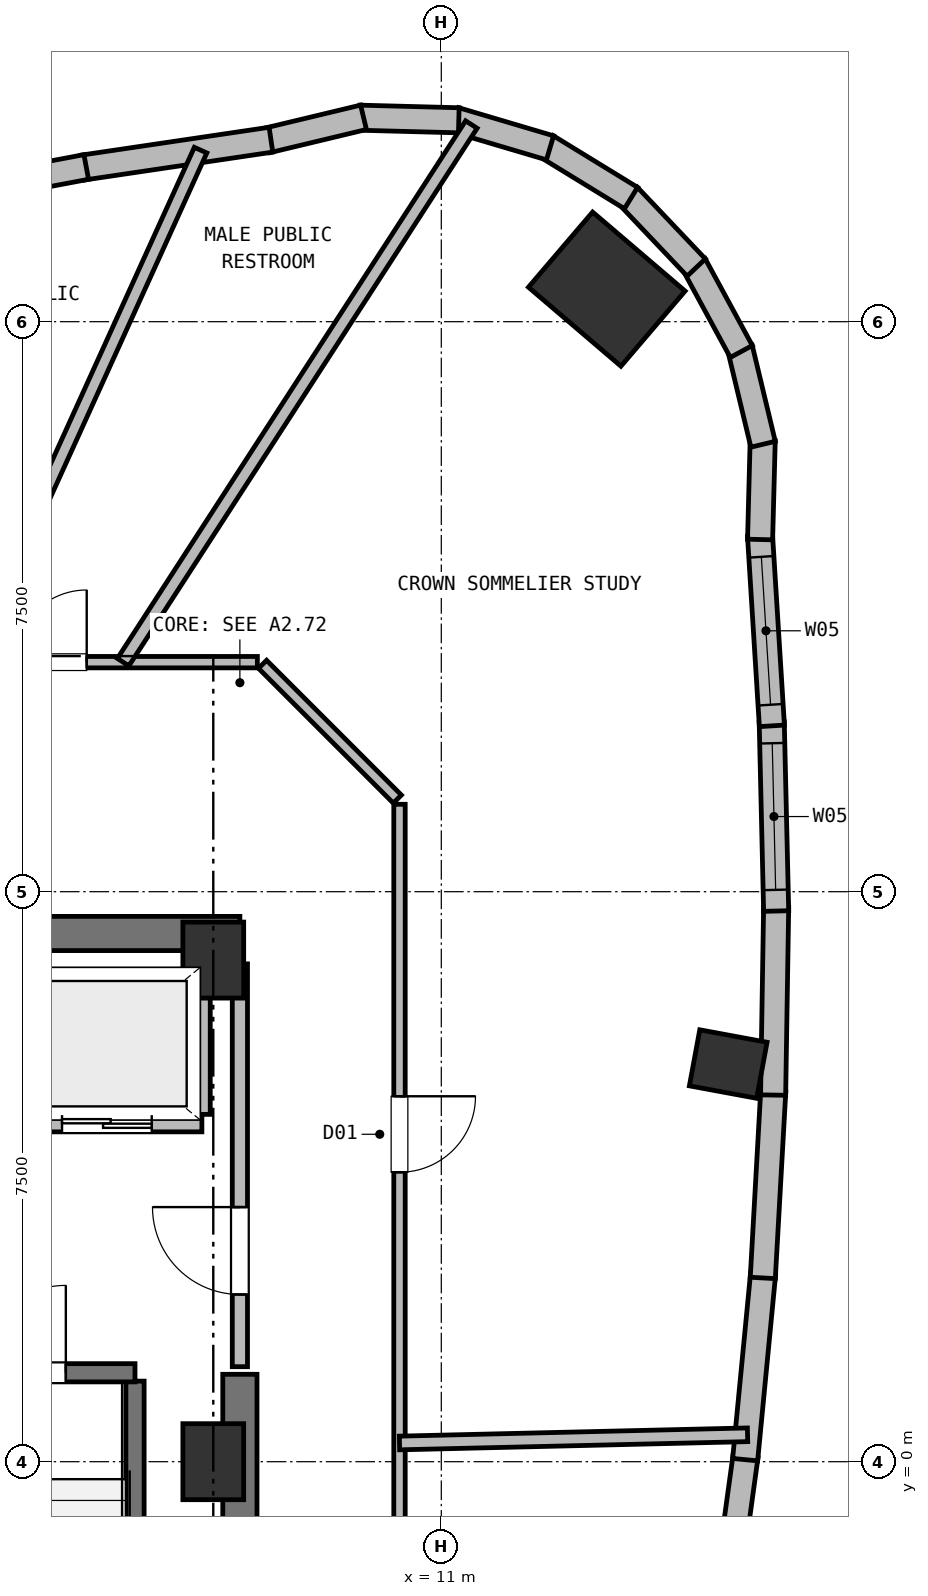
"""IFC4 building model, lengths in metres.
Left out: names, types, materials, properties, quantities, classifications, styles, units other than length and angle.
Written with IfcOpenShell. Run it as: python <this file> out.ifc"""

import sys

from ifc_helpers import new_model, si_unit, direction, frame, frame_2d, origin, origin_2d, place, context, subcontext, project, spatial, rectangle, extrude, element, fill, save


model = new_model("IFC4")
c1 = context("Model", 3, precision=1e-05, world=origin(), true_north=direction((0.0, 1.0)))
c2 = subcontext(c1, "Body", "Model", "MODEL_VIEW")
j1 = project(units=[si_unit("LENGTHUNIT", "METRE"), si_unit("PLANEANGLEUNIT", "RADIAN")], contexts=[c1])
p1 = place(None, origin())
s1 = spatial("IfcSite", under=j1, at=p1, CompositionType="ELEMENT")
p2 = place(p1, origin())
s2 = spatial("IfcBuilding", under=s1, at=p2, CompositionType="ELEMENT")
p3 = place(p2, frame((0.0, 0.0, 272.8)))
s3 = spatial("IfcBuildingStorey", under=s2, at=p3, CompositionType="ELEMENT", Elevation=272.8)
for number, where, z_axis, x_axis in (
    (1, (8.0, 0.0, 0.0), (0.0, 0.0, 1.0), (1.0, 0.0, 0.0)),
    (2, (8.0, 6.6, 0.0), (0.0, 0.0, 1.0), (1.0, 0.0, 0.0)),
):
    element("IfcColumn", number, at=place(p3, frame(where, z_axis=z_axis, x_axis=x_axis)), inside=s3, PredefinedType="COLUMN", context=c2, shape_type="SweptSolid", body=[
        extrude(rectangle(XDim=0.8, YDim=1.0, at=origin_2d()), origin(), (0.0, 0.0, 1.0), 4.4),
    ])
p4 = place(p3, frame((-8.35, 6.95, 0.0), z_axis=(0.0, 0.0, 1.0), x_axis=(1.0, 0.0, 0.0)))
e3 = element("IfcWall", 3, at=p4, inside=s3, PredefinedType="SHEAR", context=c2, shape_type="SweptSolid", body=[
    extrude(rectangle(XDim=16.7, YDim=0.45, at=frame_2d((8.35, 0.0))), origin(), (0.0, 0.0, 1.0), 4.15),
])
p5 = place(p3, frame((8.35, -6.95, 0.0), z_axis=(0.0, 0.0, 1.0), x_axis=(0.0, 1.0, 0.0)))
e4 = element("IfcWall", 4, at=p5, inside=s3, PredefinedType="SHEAR", context=c2, shape_type="SweptSolid", body=[
    extrude(rectangle(XDim=8.1, YDim=0.45, at=frame_2d((4.05, 0.0))), origin(), (0.0, 0.0, 1.0), 4.15),
])
p6 = place(p3, frame((14.775, 5.232, 0.0), z_axis=(0.0, 0.0, 1.0), x_axis=(0.182235525492, 0.983254907564, 0.0)))
e5 = element("IfcColumn", 5, at=p6, inside=s3, PredefinedType="COLUMN", context=c2, shape_type="SweptSolid", body=[
    extrude(rectangle(XDim=0.75, YDim=0.9, at=origin_2d()), origin(), (0.0, 0.0, 1.0), 4.4),
])
p7 = place(p3, frame((13.177, 15.428, 0.0), z_axis=(0.0, 0.0, 1.0), x_axis=(0.64944804833, 0.7604059656, 0.0)))
e6 = element("IfcColumn", 6, at=p7, inside=s3, PredefinedType="COLUMN", context=c2, shape_type="SweptSolid", body=[
    extrude(rectangle(XDim=1.3, YDim=1.6, at=origin_2d()), origin(), (0.0, 0.0, 1.0), 4.4),
])
p8 = place(p3, frame((15.003, 0.077, 0.0), z_axis=(0.0, 0.0, 1.0), x_axis=(-0.136310087879, -0.990666220249, 0.0)))
e7 = element("IfcWall", 7, at=p8, inside=s3, PredefinedType="SOLIDWALL", context=c2, shape_type="SweptSolid", body=[
    extrude(rectangle(XDim=2.448, YDim=0.33, at=frame_2d((1.224, 0.0))), origin(), (0.0, 0.0, 1.0), 4.15),
])
p9 = place(p3, frame((15.233, 2.468, 0.0), z_axis=(0.0, 0.0, 1.0), x_axis=(-0.096171472172, -0.995364781344, 0.0)))
e8 = element("IfcWall", 8, at=p9, inside=s3, PredefinedType="SOLIDWALL", context=c2, shape_type="SweptSolid", body=[
    extrude(rectangle(XDim=2.452, YDim=0.33, at=frame_2d((1.226, 0.0))), origin(), (0.0, 0.0, 1.0), 4.15),
])
p10 = place(p3, frame((15.367, 4.874, 0.0), z_axis=(0.0, 0.0, 1.0), x_axis=(-0.055970171644, -0.998432441323, 0.0)))
e9 = element("IfcWall", 9, at=p10, inside=s3, PredefinedType="SOLIDWALL", context=c2, shape_type="SweptSolid", body=[
    extrude(rectangle(XDim=2.46, YDim=0.33, at=frame_2d((1.23, 0.0))), origin(), (0.0, 0.0, 1.0), 4.15),
])
p11 = place(p3, frame((15.406, 7.295, 0.0), z_axis=(0.0, 0.0, 1.0), x_axis=(-0.016099859072, -0.999870388869, 0.0)))
e10 = element("IfcWall", 10, at=p11, inside=s3, PredefinedType="SOLIDWALL", context=c2, shape_type="SweptSolid", body=[
    extrude(rectangle(XDim=2.472, YDim=0.33, at=frame_2d((1.236, 0.0))), origin(), (0.0, 0.0, 1.0), 4.15),
])
p12 = place(p3, frame((15.347, 9.732, 0.0), z_axis=(0.0, 0.0, 1.0), x_axis=(0.023459423149, -0.999724789862, 0.0)))
e11 = element("IfcWall", 11, at=p12, inside=s3, PredefinedType="SOLIDWALL", context=c2, shape_type="SweptSolid", body=[
    extrude(rectangle(XDim=2.487, YDim=0.33, at=frame_2d((1.244, 0.0))), origin(), (0.0, 0.0, 1.0), 4.15),
])
p13 = place(p12, frame((0.279, 0.0, 0.72)))
e12 = element("IfcOpeningElement", 12, at=p13, cuts=e11, PredefinedType="OPENING", context=c2, shape_type="SweptSolid", body=[
    extrude(rectangle(XDim=1.93, YDim=2.15, at=frame_2d((0.965, 1.075))), frame((0.0, 0.175, 0.0), z_axis=(0.0, -1.0, 0.0), x_axis=(1.0, 0.0, 0.0)), (0.0, 0.0, 1.0), 0.35),
])
p14 = place(p3, frame((15.193, 12.184, 0.0), z_axis=(0.0, 0.0, 1.0), x_axis=(0.062329780416, -0.998055608908, 0.0)))
e13 = element("IfcWall", 13, at=p14, inside=s3, PredefinedType="SOLIDWALL", context=c2, shape_type="SweptSolid", body=[
    extrude(rectangle(XDim=2.507, YDim=0.33, at=frame_2d((1.253, 0.0))), origin(), (0.0, 0.0, 1.0), 4.15),
])
p15 = place(p14, frame((0.278, 0.0, 0.72)))
e14 = element("IfcOpeningElement", 14, at=p15, cuts=e13, PredefinedType="OPENING", context=c2, shape_type="SweptSolid", body=[
    extrude(rectangle(XDim=1.95, YDim=2.15, at=frame_2d((0.975, 1.075))), frame((0.0, 0.175, 0.0), z_axis=(0.0, -1.0, 0.0), x_axis=(1.0, 0.0, 0.0)), (0.0, 0.0, 1.0), 0.35),
])
p16 = place(p3, frame((15.229, 13.437, 0.0), z_axis=(0.0, 0.0, 1.0), x_axis=(-0.026227855826, -0.999655990618, 0.0)))
e15 = element("IfcWall", 15, at=p16, inside=s3, PredefinedType="SOLIDWALL", context=c2, shape_type="SweptSolid", body=[
    extrude(rectangle(XDim=1.303, YDim=0.33, at=frame_2d((0.652, 0.0))), origin(), (0.0, 0.0, 1.0), 4.15),
])
p17 = place(p3, frame((14.929, 14.654, 0.0), z_axis=(0.0, 0.0, 1.0), x_axis=(0.233443812137, -0.972370292931, 0.0)))
e16 = element("IfcWall", 16, at=p17, inside=s3, PredefinedType="SOLIDWALL", context=c2, shape_type="SweptSolid", body=[
    extrude(rectangle(XDim=1.303, YDim=0.33, at=frame_2d((0.651, 0.0))), origin(), (0.0, 0.0, 1.0), 4.15),
])
for number, where, z_axis, x_axis in (
    (17, (14.325, 15.753, 0.0), (0.0, 0.0, 1.0), (0.477, -0.879, 0.0)),
    (18, (13.458, 16.658, 0.0), (0.0, 0.0, 1.0), (0.688, -0.725, 0.0)),
    (19, (12.385, 17.308, 0.0), (0.0, 0.0, 1.0), (0.853, -0.523, 0.0)),
    (20, (11.181, 17.658, 0.0), (0.0, 0.0, 1.0), (0.959, -0.284, 0.0)),
    (21, (9.927, 17.684, 0.0), (0.0, 0.0, 1.0), (1.0, -0.026, 0.0)),
):
    element("IfcWall", number, at=place(p3, frame(where, z_axis=z_axis, x_axis=x_axis)), inside=s3, PredefinedType="SOLIDWALL", context=c2, shape_type="SweptSolid", body=[
        extrude(rectangle(XDim=1.303, YDim=0.33, at=frame_2d((0.652, 0.0))), origin(), (0.0, 0.0, 1.0), 4.15),
    ])
p18 = place(p3, frame((8.71, 17.385, 0.0), z_axis=(0.0, 0.0, 1.0), x_axis=(0.972360080062, 0.233486347997, 0.0)))
e22 = element("IfcWall", 22, at=p18, inside=s3, PredefinedType="SOLIDWALL", context=c2, shape_type="SweptSolid", body=[
    extrude(rectangle(XDim=1.303, YDim=0.33, at=frame_2d((0.651, 0.0))), origin(), (0.0, 0.0, 1.0), 4.15),
])
p19 = place(p3, frame((6.279, 17.027, 0.0), z_axis=(0.0, 0.0, 1.0), x_axis=(0.989195615859, 0.146601615152, 0.0)))
e23 = element("IfcWall", 23, at=p19, inside=s3, PredefinedType="SOLIDWALL", context=c2, shape_type="SweptSolid", body=[
    extrude(rectangle(XDim=2.506, YDim=0.33, at=frame_2d((1.253, 0.0))), origin(), (0.0, 0.0, 1.0), 4.15),
])
p20 = place(p3, frame((3.884, 16.575, 0.0), z_axis=(0.0, 0.0, 1.0), x_axis=(0.982755323562, 0.184910719024, 0.0)))
e24 = element("IfcWall", 24, at=p20, inside=s3, PredefinedType="SOLIDWALL", context=c2, shape_type="SweptSolid", body=[
    extrude(rectangle(XDim=2.488, YDim=0.33, at=frame_2d((1.244, 0.0))), origin(), (0.0, 0.0, 1.0), 4.15),
])
p21 = place(p3, frame((6.97, -6.16, 0.0), z_axis=(0.0, 0.0, 1.0), x_axis=(0.0, 1.0, 0.0)))
e25 = element("IfcWall", 25, at=p21, inside=s3, PredefinedType="SHEAR", context=c2, shape_type="SweptSolid", body=[
    extrude(rectangle(XDim=7.22, YDim=0.24, at=frame_2d((3.61, 0.0))), origin(), (0.0, 0.0, 1.0), 4.15),
])
p22 = place(p3, frame((4.01, 1.17, 0.0), z_axis=(0.0, 0.0, 1.0), x_axis=(1.0, 0.0, 0.0)))
e26 = element("IfcWall", 26, at=p22, inside=s3, PredefinedType="SHEAR", context=c2, shape_type="SweptSolid", body=[
    extrude(rectangle(XDim=2.96, YDim=0.24, at=frame_2d((1.48, 0.0))), origin(), (0.0, 0.0, 1.0), 4.15),
])
p23 = place(p22, frame((0.9, 0.0, 0.0)))
e27 = element("IfcOpeningElement", 27, at=p23, cuts=e26, PredefinedType="OPENING", context=c2, shape_type="SweptSolid", body=[
    extrude(rectangle(XDim=1.15, YDim=2.15, at=frame_2d((0.575, 1.075))), frame((0.0, 0.13, 0.0), z_axis=(0.0, -1.0, 0.0), x_axis=(1.0, 0.0, 0.0)), (0.0, 0.0, 1.0), 0.26),
])
p24 = place(p3, frame((5.35, 4.45, 0.0), z_axis=(0.0, 0.0, 1.0), x_axis=(1.0, 0.0, 0.0)))
e28 = element("IfcWall", 28, at=p24, inside=s3, PredefinedType="PARTITIONING", context=c2, shape_type="SweptSolid", body=[
    extrude(rectangle(XDim=2.5, YDim=0.22, at=frame_2d((1.25, 0.0))), origin(), (0.0, 0.0, 1.0), 4.15),
])
p25 = place(p24, frame((0.66, 0.0, 0.0)))
e29 = element("IfcOpeningElement", 29, at=p25, cuts=e28, PredefinedType="OPENING", context=c2, shape_type="SweptSolid", body=[
    extrude(rectangle(XDim=1.18, YDim=2.15, at=frame_2d((0.59, 1.075))), frame((0.0, 0.12, 0.0), z_axis=(0.0, -1.0, 0.0), x_axis=(1.0, 0.0, 0.0)), (0.0, 0.0, 1.0), 0.24),
])
p26 = place(p3, frame((7.85, 4.57, 0.0), z_axis=(0.0, 0.0, 1.0), x_axis=(0.0, 1.0, 0.0)))
e30 = element("IfcWall", 30, at=p26, inside=s3, PredefinedType="PARTITIONING", context=c2, shape_type="SweptSolid", body=[
    extrude(rectangle(XDim=2.155, YDim=0.22, at=frame_2d((1.078, 0.0))), origin(), (0.0, 0.0, 1.0), 3.83),
])
p27 = place(p3, frame((8.35, 1.25, 0.0), z_axis=(0.0, 0.0, 1.0), x_axis=(0.0, 1.0, 0.0)))
e31 = element("IfcWall", 31, at=p27, inside=s3, PredefinedType="PARTITIONING", context=c2, shape_type="SweptSolid", body=[
    extrude(rectangle(XDim=5.3, YDim=0.2, at=frame_2d((2.65, 0.0))), origin(), (0.0, 0.0, 1.0), 4.15),
])
p28 = place(p27, frame((0.95, 0.0, 0.0)))
e32 = element("IfcOpeningElement", 32, at=p28, cuts=e31, PredefinedType="OPENING", context=c2, shape_type="SweptSolid", body=[
    extrude(rectangle(XDim=1.15, YDim=2.15, at=frame_2d((0.575, 1.075))), frame((0.0, 0.11, 0.0), z_axis=(0.0, -1.0, 0.0), x_axis=(1.0, 0.0, 0.0)), (0.0, 0.0, 1.0), 0.22),
])
p29 = place(p3, frame((10.45, 8.65, 0.0), z_axis=(0.0, 0.0, 1.0), x_axis=(0.0, -1.0, 0.0)))
e33 = element("IfcWall", 33, at=p29, inside=s3, PredefinedType="PARTITIONING", context=c2, shape_type="SweptSolid", body=[
    extrude(rectangle(XDim=15.89, YDim=0.15, at=frame_2d((7.945, 0.0))), origin(), (0.0, 0.0, 1.0), 3.86),
])
p30 = place(p29, frame((11.597, 0.0, 0.0)))
e34 = element("IfcOpeningElement", 34, at=p30, cuts=e33, PredefinedType="OPENING", context=c2, shape_type="SweptSolid", body=[
    extrude(rectangle(XDim=1.0, YDim=2.15, at=frame_2d((0.5, 1.075))), frame((0.0, 0.085, 0.0), z_axis=(0.0, -1.0, 0.0), x_axis=(1.0, 0.0, 0.0)), (0.0, 0.0, 1.0), 0.17),
])
p31 = place(p29, frame((3.842, 0.0, 0.0)))
e35 = element("IfcOpeningElement", 35, at=p31, cuts=e33, PredefinedType="OPENING", context=c2, shape_type="SweptSolid", body=[
    extrude(rectangle(XDim=1.0, YDim=2.15, at=frame_2d((0.5, 1.075))), frame((0.0, 0.085, 0.0), z_axis=(0.0, -1.0, 0.0), x_axis=(1.0, 0.0, 0.0)), (0.0, 0.0, 1.0), 0.17),
])
p32 = place(p3, frame((8.648, 10.492, 0.0), z_axis=(0.0, 0.0, 1.0), x_axis=(0.707106781187, -0.707106781187, 0.0)))
e36 = element("IfcWall", 36, at=p32, inside=s3, PredefinedType="PARTITIONING", context=c2, shape_type="SweptSolid", body=[
    extrude(rectangle(XDim=2.508, YDim=0.15, at=frame_2d((1.254, 0.0))), origin(), (0.0, 0.0, 1.0), 4.15),
])
p33 = place(p3, frame((-11.51, 10.52, 0.0), z_axis=(0.0, 0.0, 1.0), x_axis=(1.0, 0.0, 0.0)))
e37 = element("IfcWall", 37, at=p33, inside=s3, PredefinedType="PARTITIONING", context=c2, shape_type="SweptSolid", body=[
    extrude(rectangle(XDim=20.09, YDim=0.15, at=frame_2d((10.045, 0.0))), origin(), (0.0, 0.0, 1.0), 4.15),
])
p34 = place(p33, frame((12.646, 0.0, 0.0)))
e38 = element("IfcOpeningElement", 38, at=p34, cuts=e37, PredefinedType="OPENING", context=c2, shape_type="SweptSolid", body=[
    extrude(rectangle(XDim=0.95, YDim=2.1, at=frame_2d((0.475, 1.05))), frame((0.0, 0.085, 0.0), z_axis=(0.0, -1.0, 0.0), x_axis=(1.0, 0.0, 0.0)), (0.0, 0.0, 1.0), 0.17),
])
p35 = place(p33, frame((14.763, 0.0, 0.0)))
e39 = element("IfcOpeningElement", 39, at=p35, cuts=e37, PredefinedType="OPENING", context=c2, shape_type="SweptSolid", body=[
    extrude(rectangle(XDim=0.95, YDim=2.1, at=frame_2d((0.475, 1.05))), frame((0.0, 0.085, 0.0), z_axis=(0.0, -1.0, 0.0), x_axis=(1.0, 0.0, 0.0)), (0.0, 0.0, 1.0), 0.17),
])
p36 = place(p33, frame((16.895, 0.0, 0.0)))
e40 = element("IfcOpeningElement", 40, at=p36, cuts=e37, PredefinedType="OPENING", context=c2, shape_type="SweptSolid", body=[
    extrude(rectangle(XDim=0.95, YDim=2.1, at=frame_2d((0.475, 1.05))), frame((0.0, 0.085, 0.0), z_axis=(0.0, -1.0, 0.0), x_axis=(1.0, 0.0, 0.0)), (0.0, 0.0, 1.0), 0.17),
])
p37 = place(p33, frame((5.671, 0.0, 0.0)))
e41 = element("IfcOpeningElement", 41, at=p37, cuts=e37, PredefinedType="OPENING", context=c2, shape_type="SweptSolid", body=[
    extrude(rectangle(XDim=1.0, YDim=2.15, at=frame_2d((0.5, 1.075))), frame((0.0, 0.085, 0.0), z_axis=(0.0, -1.0, 0.0), x_axis=(1.0, 0.0, 0.0)), (0.0, 0.0, 1.0), 0.17),
])
p38 = place(p3, frame((10.45, 0.246, 0.0), z_axis=(0.0, 0.0, 1.0), x_axis=(0.999722471899, 0.023557996086, 0.0)))
e42 = element("IfcWall", 42, at=p38, inside=s3, PredefinedType="PARTITIONING", context=c2, shape_type="SweptSolid", body=[
    extrude(rectangle(XDim=4.581, YDim=0.18, at=frame_2d((2.29, 0.0))), origin(), (0.0, 0.0, 1.0), 4.15),
])
p39 = place(p3, frame((6.814, 10.52, 0.0), z_axis=(0.0, 0.0, 1.0), x_axis=(0.543628362799, 0.839326041035, 0.0)))
e43 = element("IfcWall", 43, at=p39, inside=s3, PredefinedType="PARTITIONING", context=c2, shape_type="SweptSolid", body=[
    extrude(rectangle(XDim=8.428, YDim=0.18, at=frame_2d((4.214, 0.0))), origin(), (0.0, 0.0, 1.0), 4.15),
])
p40 = place(p3, frame((4.775, 10.52, 0.0), z_axis=(0.0, 0.0, 1.0), x_axis=(0.41332058742, 0.910585576437, 0.0)))
e44 = element("IfcWall", 44, at=p40, inside=s3, PredefinedType="PARTITIONING", context=c2, shape_type="SweptSolid", body=[
    extrude(rectangle(XDim=7.399, YDim=0.18, at=frame_2d((3.699, 0.0))), origin(), (0.0, 0.0, 1.0), 4.15),
])
p41 = place(p13, origin())
e45 = element("IfcWindow", 45, at=p41, inside=s3, PartitioningType="SINGLE_PANEL", PredefinedType="WINDOW", context=c2, shape_type="SweptSolid", body=[
    extrude(rectangle(XDim=1.93, YDim=2.15, at=frame_2d((0.965, 1.075))), frame((0.0, 0.03, 0.0), z_axis=(0.0, -1.0, 0.0), x_axis=(1.0, 0.0, 0.0)), (0.0, 0.0, 1.0), 0.06),
])
fill(e12, e45)
p42 = place(p15, origin())
e46 = element("IfcWindow", 46, at=p42, inside=s3, PartitioningType="SINGLE_PANEL", PredefinedType="WINDOW", context=c2, shape_type="SweptSolid", body=[
    extrude(rectangle(XDim=1.95, YDim=2.15, at=frame_2d((0.975, 1.075))), frame((0.0, 0.03, 0.0), z_axis=(0.0, -1.0, 0.0), x_axis=(1.0, 0.0, 0.0)), (0.0, 0.0, 1.0), 0.06),
])
fill(e14, e46)
p43 = place(p23, origin())
e47 = element("IfcDoor", 47, at=p43, inside=s3, OperationType="SINGLE_SWING_RIGHT", PredefinedType="DOOR", context=c2, shape_type="SweptSolid", body=[
    extrude(rectangle(XDim=1.15, YDim=2.15, at=frame_2d((0.575, 1.075))), frame((0.0, 0.025, 0.0), z_axis=(0.0, -1.0, 0.0), x_axis=(1.0, 0.0, 0.0)), (0.0, 0.0, 1.0), 0.05),
])
fill(e27, e47)
p44 = place(p25, origin())
e48 = element("IfcDoor", 48, at=p44, inside=s3, OperationType="DOUBLE_DOOR_SLIDING", PredefinedType="DOOR", context=c2, shape_type="SweptSolid", body=[
    extrude(rectangle(XDim=1.18, YDim=2.15, at=frame_2d((0.59, 1.075))), frame((0.0, 0.025, 0.0), z_axis=(0.0, -1.0, 0.0), x_axis=(1.0, 0.0, 0.0)), (0.0, 0.0, 1.0), 0.05),
])
fill(e29, e48)
p45 = place(p28, origin())
e49 = element("IfcDoor", 49, at=p45, inside=s3, OperationType="SINGLE_SWING_RIGHT", PredefinedType="DOOR", context=c2, shape_type="SweptSolid", body=[
    extrude(rectangle(XDim=1.15, YDim=2.15, at=frame_2d((0.575, 1.075))), frame((0.0, 0.025, 0.0), z_axis=(0.0, -1.0, 0.0), x_axis=(1.0, 0.0, 0.0)), (0.0, 0.0, 1.0), 0.05),
])
fill(e32, e49)
p46 = place(p36, origin())
e50 = element("IfcDoor", 50, at=p46, inside=s3, OperationType="SINGLE_SWING_RIGHT", PredefinedType="DOOR", context=c2, shape_type="SweptSolid", body=[
    extrude(rectangle(XDim=0.95, YDim=2.1, at=frame_2d((0.475, 1.05))), frame((0.0, 0.025, 0.0), z_axis=(0.0, -1.0, 0.0), x_axis=(1.0, 0.0, 0.0)), (0.0, 0.0, 1.0), 0.05),
])
fill(e40, e50)
p47 = place(p31, origin())
e51 = element("IfcDoor", 51, at=p47, inside=s3, OperationType="SINGLE_SWING_LEFT", PredefinedType="DOOR", context=c2, shape_type="SweptSolid", body=[
    extrude(rectangle(XDim=1.0, YDim=2.15, at=frame_2d((0.5, 1.075))), frame((0.0, 0.025, 0.0), z_axis=(0.0, -1.0, 0.0), x_axis=(1.0, 0.0, 0.0)), (0.0, 0.0, 1.0), 0.05),
])
fill(e35, e51)
save(model, sys.argv[1])
